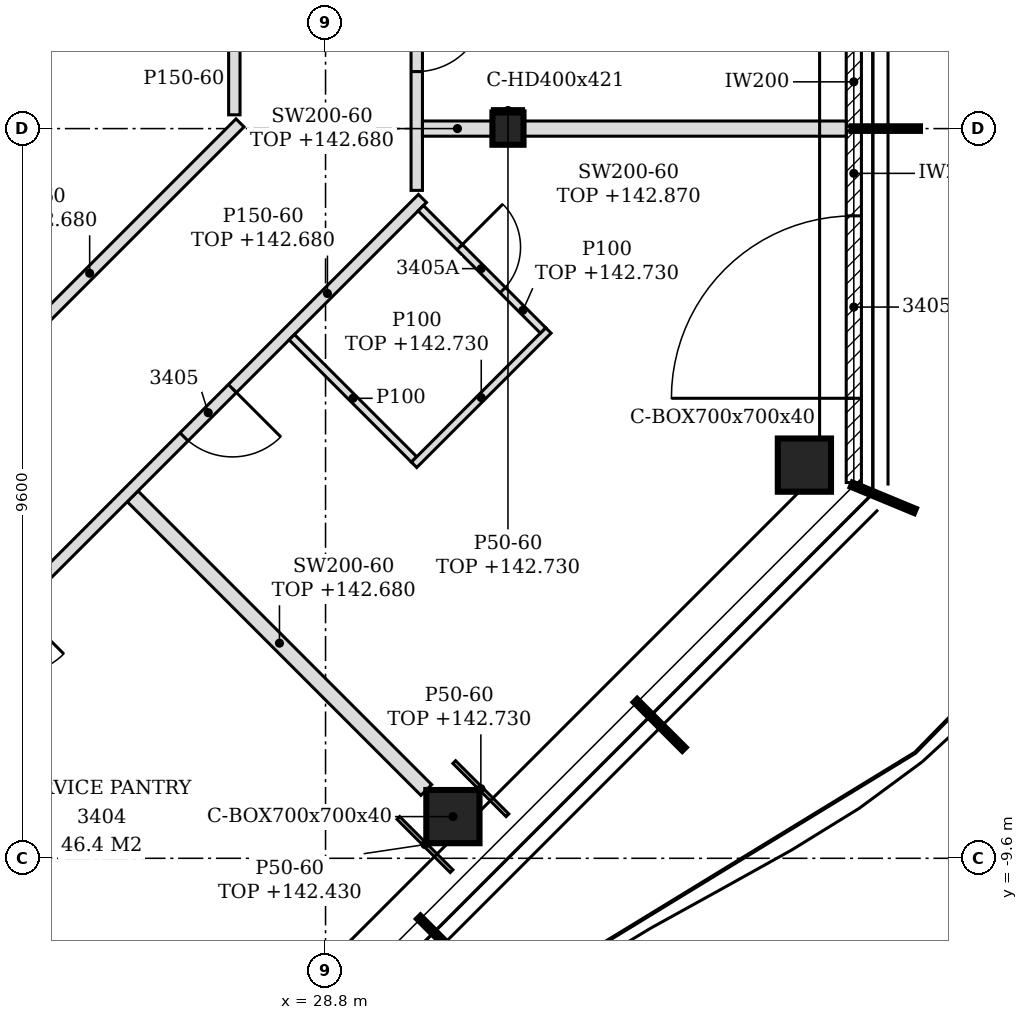
"""IFC4 building model, lengths in metres.
Left out: names, types, materials, properties, quantities, classifications, styles, units other than length and angle.
Written with IfcOpenShell. Run it as: python <this file> out.ifc"""

import sys

from ifc_helpers import new_model, si_unit, direction, frame, frame_2d, origin, origin_2d, place, context, subcontext, project, spatial, polyline, rectangle, hollow_rectangle, i_section, outline, extrude, element, fill, save


model = new_model("IFC4")
c1 = context("Model", 3, precision=1e-05, world=origin(), true_north=direction((0.0, 1.0)))
c2 = subcontext(c1, "Body", "Model", "MODEL_VIEW")
j1 = project(units=[si_unit("LENGTHUNIT", "METRE"), si_unit("PLANEANGLEUNIT", "RADIAN")], contexts=[c1])
p1 = place(None, origin())
s1 = spatial("IfcSite", under=j1, at=p1, CompositionType="ELEMENT")
p2 = place(p1, origin())
s2 = spatial("IfcBuilding", under=s1, at=p2, CompositionType="ELEMENT")
p3 = place(p2, frame((0.0, 0.0, 139.8)))
s3 = spatial("IfcBuildingStorey", under=s2, at=p3, CompositionType="ELEMENT", Elevation=139.8)
for number, where, z_axis, x_axis in (
    (1, (30.476, -9.052, -0.15), (0.0, 0.0, 1.0), (1.0, 0.0, 0.0)),
    (2, (35.1, -4.427, -0.15), (0.0, 0.0, 1.0), (1.0, 0.0, 0.0)),
):
    element("IfcColumn", number, at=place(p3, frame(where, z_axis=z_axis, x_axis=x_axis)), inside=s3, PredefinedType="COLUMN", context=c2, shape_type="SweptSolid", body=[
        extrude(hollow_rectangle(XDim=0.7, YDim=0.7, WallThickness=0.04, at=origin_2d()), origin(), (0.0, 0.0, 1.0), 3.6),
    ])
p4 = place(p3, frame((31.2, 0.0, -0.15), z_axis=(0.0, 0.0, 1.0), x_axis=(1.0, 0.0, 0.0)))
e3 = element("IfcColumn", 3, at=p4, inside=s3, PredefinedType="COLUMN", context=c2, shape_type="SweptSolid", body=[
    extrude(i_section(OverallWidth=0.409, OverallDepth=0.425, WebThickness=0.033, FlangeThickness=0.052, FilletRadius=0.015, at=origin_2d()), origin(), (0.0, 0.0, 1.0), 3.6),
])
p5 = place(p3, frame((35.75, -4.656, 0.0), z_axis=(0.0, 0.0, 1.0), x_axis=(0.0, 1.0, 0.0)))
e4 = element("IfcWall", 4, at=p5, inside=s3, PredefinedType="NOTDEFINED", context=c2, shape_type="SweptSolid", body=[
    extrude(rectangle(XDim=4.626, YDim=0.2, at=frame_2d((2.313, 0.0))), origin(), (0.0, 0.0, 1.0), 3.45),
])
p6 = place(p5, frame((1.108, 0.0, 0.0)))
e5 = element("IfcOpeningElement", 5, at=p6, cuts=e4, PredefinedType="OPENING", context=c2, shape_type="SweptSolid", body=[
    extrude(rectangle(XDim=2.4, YDim=2.4, at=frame_2d((1.2, 1.2))), frame((0.0, 0.11, 0.0), z_axis=(0.0, -1.0, 0.0), x_axis=(1.0, 0.0, 0.0)), (0.0, 0.0, 1.0), 0.22),
])
p7 = place(p3, frame((35.75, 0.03, 0.0), z_axis=(0.0, 0.0, 1.0), x_axis=(0.0, 1.0, 0.0)))
e6 = element("IfcWall", 6, at=p7, inside=s3, PredefinedType="NOTDEFINED", context=c2, shape_type="SweptSolid", body=[
    extrude(rectangle(XDim=4.74, YDim=0.2, at=frame_2d((2.37, 0.0))), origin(), (0.0, 0.0, 1.0), 3.45),
])
p8 = place(p7, frame((1.17, 0.0, 0.0)))
e7 = element("IfcOpeningElement", 7, at=p8, cuts=e6, PredefinedType="OPENING", context=c2, shape_type="SweptSolid", body=[
    extrude(rectangle(XDim=2.4, YDim=2.4, at=frame_2d((1.2, 1.2))), frame((0.0, 0.11, 0.0), z_axis=(0.0, -1.0, 0.0), x_axis=(1.0, 0.0, 0.0)), (0.0, 0.0, 1.0), 0.22),
])
p9 = place(p3, frame((25.502, -13.326, 0.0), z_axis=(0.0, 0.0, 1.0), x_axis=(-0.707106781187, 0.707106781187, 0.0)))
e8 = element("IfcWall", 8, at=p9, inside=s3, PredefinedType="PARTITIONING", context=c2, shape_type="SweptSolid", body=[
    extrude(rectangle(XDim=6.76, YDim=0.2, at=frame_2d((3.38, 0.0))), origin(), (0.0, 0.0, 1.0), 2.93),
])
p10 = place(p3, frame((30.125, -8.702, 0.0), z_axis=(0.0, 0.0, 1.0), x_axis=(-0.707084440093, 0.707129121574, 0.0)))
e9 = element("IfcWall", 9, at=p10, inside=s3, PredefinedType="PARTITIONING", context=c2, shape_type="SweptSolid", body=[
    extrude(rectangle(XDim=5.464, YDim=0.2, at=frame_2d((2.732, 0.0))), origin(), (0.0, 0.0, 1.0), 2.88),
])
p11 = place(p3, frame((22.722, -8.272, 0.0), z_axis=(0.0, 0.0, 1.0), x_axis=(0.707106781187, 0.707106781187, 0.0)))
e10 = element("IfcWall", 10, at=p11, inside=s3, PredefinedType="PARTITIONING", context=c2, shape_type="SweptSolid", body=[
    extrude(rectangle(XDim=10.399, YDim=0.15, at=frame_2d((5.199, 0.0))), origin(), (0.0, 0.0, 1.0), 2.88),
])
p12 = place(p11, frame((1.925, 0.0, 0.0)))
e11 = element("IfcOpeningElement", 11, at=p12, cuts=e10, PredefinedType="OPENING", context=c2, shape_type="SweptSolid", body=[
    extrude(rectangle(XDim=0.9, YDim=2.1, at=frame_2d((0.45, 1.05))), frame((0.0, 0.085, 0.0), z_axis=(0.0, -1.0, 0.0), x_axis=(1.0, 0.0, 0.0)), (0.0, 0.0, 1.0), 0.17),
])
p13 = place(p11, frame((5.963, 0.0, 0.0)))
e12 = element("IfcOpeningElement", 12, at=p13, cuts=e10, PredefinedType="OPENING", context=c2, shape_type="SweptSolid", body=[
    extrude(rectangle(XDim=0.9, YDim=2.1, at=frame_2d((0.45, 1.05))), frame((0.0, 0.085, 0.0), z_axis=(0.0, -1.0, 0.0), x_axis=(1.0, 0.0, 0.0)), (0.0, 0.0, 1.0), 0.17),
])
p14 = place(p3, frame((19.408, -8.191, 0.0), z_axis=(0.0, 0.0, 1.0), x_axis=(0.707117222888, 0.707096339331, 0.0)))
e13 = element("IfcWall", 13, at=p14, inside=s3, PredefinedType="PARTITIONING", context=c2, shape_type="SweptSolid", body=[
    extrude(rectangle(XDim=11.691, YDim=0.15, at=frame_2d((5.845, 0.0))), origin(), (0.0, 0.0, 1.0), 2.88),
])
p15 = place(p14, frame((5.195, 0.0, 0.0)))
e14 = element("IfcOpeningElement", 14, at=p15, cuts=e13, PredefinedType="OPENING", context=c2, shape_type="SweptSolid", body=[
    extrude(rectangle(XDim=0.9, YDim=2.1, at=frame_2d((0.45, 1.05))), frame((0.0, 0.085, 0.0), z_axis=(0.0, -1.0, 0.0), x_axis=(1.0, 0.0, 0.0)), (0.0, 0.0, 1.0), 0.17),
])
p16 = place(p3, frame((29.965, -4.353, 0.0), z_axis=(0.0, 0.0, 1.0), x_axis=(-0.707106781187, 0.707106781187, 0.0)))
e15 = element("IfcWall", 15, at=p16, inside=s3, PredefinedType="PARTITIONING", context=c2, shape_type="SweptSolid", body=[
    extrude(rectangle(XDim=2.275, YDim=0.1, at=frame_2d((1.137, 0.0))), origin(), (0.0, 0.0, 1.0), 3.45),
])
p17 = place(p3, frame((29.965, -4.423, 0.0), z_axis=(0.0, 0.0, 1.0), x_axis=(0.707155609469, 0.707057949532, 0.0)))
e16 = element("IfcWall", 16, at=p17, inside=s3, PredefinedType="PARTITIONING", context=c2, shape_type="SweptSolid", body=[
    extrude(rectangle(XDim=2.5, YDim=0.1, at=frame_2d((1.25, 0.0))), origin(), (0.0, 0.0, 1.0), 2.93),
])
p18 = place(p3, frame((31.662, -2.656, 0.0), z_axis=(0.0, 0.0, 1.0), x_axis=(-0.707160441348, 0.707053116953, 0.0)))
e17 = element("IfcWall", 17, at=p18, inside=s3, PredefinedType="PARTITIONING", context=c2, shape_type="SweptSolid", body=[
    extrude(rectangle(XDim=2.275, YDim=0.1, at=frame_2d((1.137, 0.0))), origin(), (0.0, 0.0, 1.0), 2.93),
])
p19 = place(p18, frame((0.75, 0.0, 0.0)))
e18 = element("IfcOpeningElement", 18, at=p19, cuts=e17, PredefinedType="OPENING", context=c2, shape_type="SweptSolid", body=[
    extrude(rectangle(XDim=0.8, YDim=2.1, at=frame_2d((0.4, 1.05))), frame((0.0, 0.06, 0.0), z_axis=(0.0, -1.0, 0.0), x_axis=(1.0, 0.0, 0.0)), (0.0, 0.0, 1.0), 0.12),
])
p20 = place(p3, frame((30.0, -0.813, 0.0), z_axis=(0.0, 0.0, 1.0), x_axis=(0.0, 1.0, 0.0)))
e19 = element("IfcWall", 19, at=p20, inside=s3, PredefinedType="PARTITIONING", context=c2, shape_type="SweptSolid", body=[
    extrude(outline(polyline([(0.0, 0.0), (12.834, 0.0), (12.834, 3.45), (10.518, 3.45), (10.516, 2.88), (10.308, 2.88), (10.306, 3.45), (5.718, 3.45), (5.716, 2.88), (5.508, 2.88), (5.506, 3.45), (0.918, 3.45), (0.916, 2.88), (0.708, 2.88), (0.706, 3.45), (0.0, 3.45), (0.0, 0.0)])), frame((0.0, 0.075, 0.0), z_axis=(0.0, -1.0, 0.0), x_axis=(1.0, 0.0, 0.0)), (0.0, 0.0, 1.0), 0.15),
])
p21 = place(p20, frame((1.563, 0.0, 0.0)))
e20 = element("IfcOpeningElement", 20, at=p21, cuts=e19, PredefinedType="OPENING", context=c2, shape_type="SweptSolid", body=[
    extrude(rectangle(XDim=0.9, YDim=2.1, at=frame_2d((0.45, 1.05))), frame((0.0, 0.085, 0.0), z_axis=(0.0, -1.0, 0.0), x_axis=(1.0, 0.0, 0.0)), (0.0, 0.0, 1.0), 0.17),
])
p22 = place(p20, frame((8.763, 0.0, 0.0)))
e21 = element("IfcOpeningElement", 21, at=p22, cuts=e19, PredefinedType="OPENING", context=c2, shape_type="SweptSolid", body=[
    extrude(rectangle(XDim=0.9, YDim=2.1, at=frame_2d((0.45, 1.05))), frame((0.0, 0.085, 0.0), z_axis=(0.0, -1.0, 0.0), x_axis=(1.0, 0.0, 0.0)), (0.0, 0.0, 1.0), 0.17),
])
p23 = place(p20, frame((11.121, 0.0, 0.0)))
e22 = element("IfcOpeningElement", 22, at=p23, cuts=e19, PredefinedType="OPENING", context=c2, shape_type="SweptSolid", body=[
    extrude(rectangle(XDim=0.9, YDim=2.1, at=frame_2d((0.45, 1.05))), frame((0.0, 0.085, 0.0), z_axis=(0.0, -1.0, 0.0), x_axis=(1.0, 0.0, 0.0)), (0.0, 0.0, 1.0), 0.17),
])
p24 = place(p3, frame((30.075, 0.0, 0.0), z_axis=(0.0, 0.0, 1.0), x_axis=(1.0, 0.0, 0.0)))
e23 = element("IfcWall", 23, at=p24, inside=s3, PredefinedType="PARTITIONING", context=c2, shape_type="SweptSolid", body=[
    extrude(rectangle(XDim=0.921, YDim=0.2, at=frame_2d((0.46, 0.0))), origin(), (0.0, 0.0, 1.0), 2.88),
])
p25 = place(p3, frame((31.405, 0.0, 0.0), z_axis=(0.0, 0.0, 1.0), x_axis=(1.0, 0.0, 0.0)))
e24 = element("IfcWall", 24, at=p25, inside=s3, PredefinedType="PARTITIONING", context=c2, shape_type="SweptSolid", body=[
    extrude(outline(polyline([(0.0, 0.0), (4.245, 0.0), (4.246, 3.07), (3.845, 3.07), (3.844, 2.93), (3.545, 2.93), (3.543, 3.07), (0.0, 3.07), (0.0, 0.0)])), frame((0.0, 0.1, 0.0), z_axis=(0.0, -1.0, 0.0), x_axis=(1.0, 0.0, 0.0)), (0.0, 0.0, 1.0), 0.2),
])
p26 = place(p3, frame((27.6, 0.181, 0.0), z_axis=(0.0, 0.0, 1.0), x_axis=(0.0, 1.0, 0.0)))
e25 = element("IfcWall", 25, at=p26, inside=s3, PredefinedType="PARTITIONING", context=c2, shape_type="SweptSolid", body=[
    extrude(rectangle(XDim=0.944, YDim=0.15, at=frame_2d((0.472, 0.0))), origin(), (0.0, 0.0, 1.0), 3.45),
])
p27 = place(p3, frame((30.458, -9.769, 0.0), z_axis=(0.0, 0.0, 1.0), x_axis=(-0.706983473703, 0.707230067171, 0.0)))
e26 = element("IfcWall", 26, at=p27, inside=s3, PredefinedType="PARTITIONING", context=c2, shape_type="SweptSolid", body=[
    extrude(rectangle(XDim=0.99, YDim=0.05, at=frame_2d((0.495, 0.0))), origin(), (0.0, 0.0, 1.0), 2.63),
])
p28 = place(p3, frame((31.193, -9.034, 0.0), z_axis=(0.0, 0.0, 1.0), x_axis=(-0.707106781187, 0.707106781187, 0.0)))
e27 = element("IfcWall", 27, at=p28, inside=s3, PredefinedType="PARTITIONING", context=c2, shape_type="SweptSolid", body=[
    extrude(rectangle(XDim=0.99, YDim=0.05, at=frame_2d((0.495, 0.0))), origin(), (0.0, 0.0, 1.0), 2.93),
])
p29 = place(p3, frame((30.996, 0.238, 0.0), z_axis=(0.0, 0.0, 1.0), x_axis=(1.0, 0.0, 0.0)))
e28 = element("IfcWall", 28, at=p29, inside=s3, PredefinedType="PARTITIONING", context=c2, shape_type="SweptSolid", body=[
    extrude(rectangle(XDim=0.409, YDim=0.05, at=frame_2d((0.205, 0.0))), origin(), (0.0, 0.0, 1.0), 2.93),
])
p30 = place(p6, origin())
e29 = element("IfcDoor", 29, at=p30, inside=s3, OperationType="SINGLE_SWING_LEFT", PredefinedType="DOOR", context=c2, shape_type="SweptSolid", body=[
    extrude(rectangle(XDim=2.4, YDim=2.4, at=frame_2d((1.2, 1.2))), frame((0.0, 0.025, 0.0), z_axis=(0.0, -1.0, 0.0), x_axis=(1.0, 0.0, 0.0)), (0.0, 0.0, 1.0), 0.05),
])
fill(e5, e29)
p31 = place(p13, frame((0.9, 0.0, 0.0), z_axis=(0.0, 0.0, 1.0), x_axis=(-1.0, 0.0, 0.0)))
e30 = element("IfcDoor", 30, at=p31, inside=s3, OperationType="SINGLE_SWING_LEFT", PredefinedType="DOOR", context=c2, shape_type="SweptSolid", body=[
    extrude(rectangle(XDim=0.9, YDim=2.1, at=frame_2d((0.45, 1.05))), frame((0.0, 0.025, 0.0), z_axis=(0.0, -1.0, 0.0), x_axis=(1.0, 0.0, 0.0)), (0.0, 0.0, 1.0), 0.05),
])
fill(e12, e30)
p32 = place(p19, frame((0.8, 0.0, 0.0), z_axis=(0.0, 0.0, 1.0), x_axis=(-1.0, 0.0, 0.0)))
e31 = element("IfcDoor", 31, at=p32, inside=s3, OperationType="SINGLE_SWING_LEFT", PredefinedType="DOOR", context=c2, shape_type="SweptSolid", body=[
    extrude(rectangle(XDim=0.8, YDim=2.1, at=frame_2d((0.4, 1.05))), frame((0.0, 0.025, 0.0), z_axis=(0.0, -1.0, 0.0), x_axis=(1.0, 0.0, 0.0)), (0.0, 0.0, 1.0), 0.05),
])
fill(e18, e31)
p33 = place(p21, frame((0.9, 0.0, 0.0), z_axis=(0.0, 0.0, 1.0), x_axis=(-1.0, 0.0, 0.0)))
e32 = element("IfcDoor", 32, at=p33, inside=s3, OperationType="SINGLE_SWING_LEFT", PredefinedType="DOOR", context=c2, shape_type="SweptSolid", body=[
    extrude(rectangle(XDim=0.9, YDim=2.1, at=frame_2d((0.45, 1.05))), frame((0.0, 0.025, 0.0), z_axis=(0.0, -1.0, 0.0), x_axis=(1.0, 0.0, 0.0)), (0.0, 0.0, 1.0), 0.05),
])
fill(e20, e32)
save(model, sys.argv[1])
